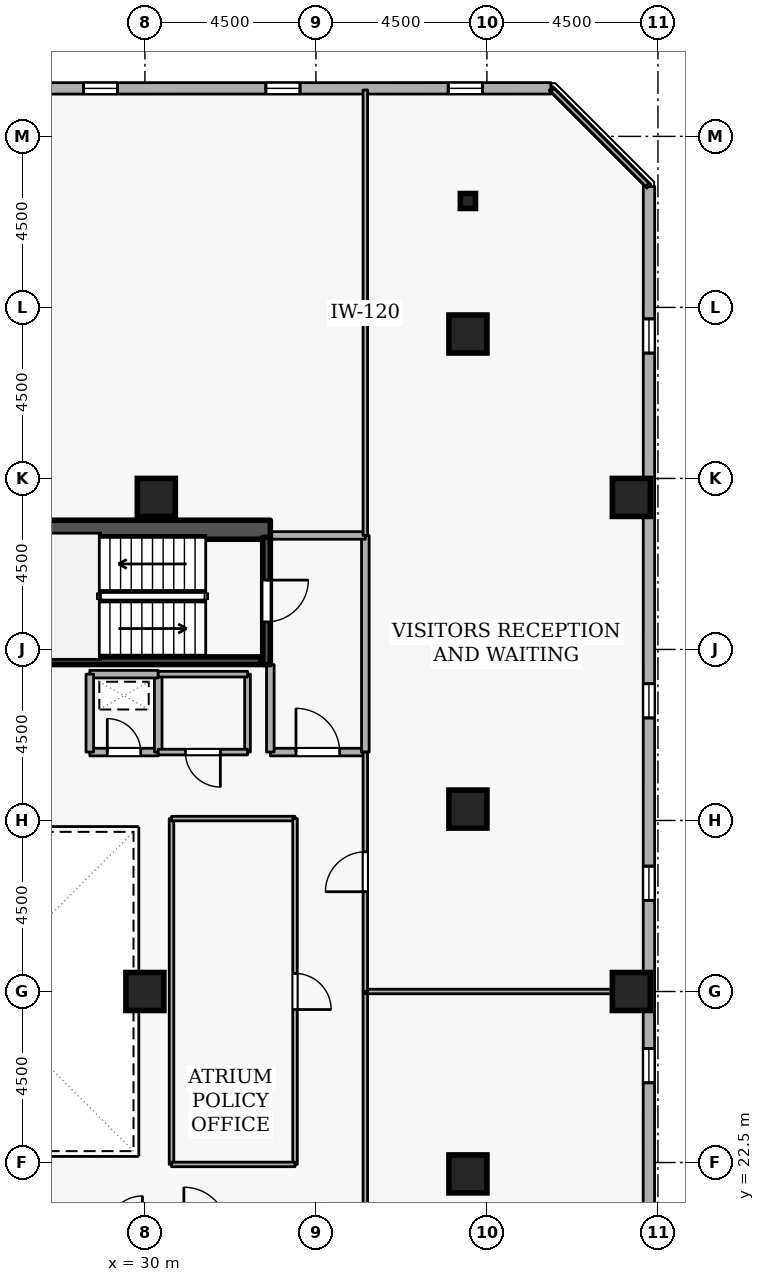
"""IFC4 building model, lengths in metres.
Left out: names, types, materials, properties, quantities, classifications, styles, units other than length and angle.
Written with IfcOpenShell. Run it as: python <this file> out.ifc"""

import sys

from ifc_helpers import new_model, si_unit, direction, frame, frame_2d, origin, origin_2d, place, context, subcontext, project, spatial, rectangle, i_section, extrude, element, fill, save


model = new_model("IFC4")
c1 = context("Model", 3, precision=1e-05, world=origin(), true_north=direction((0.0, 1.0)))
c2 = subcontext(c1, "Body", "Model", "MODEL_VIEW")
j1 = project(units=[si_unit("LENGTHUNIT", "METRE"), si_unit("PLANEANGLEUNIT", "RADIAN")], contexts=[c1])
p1 = place(None, origin())
s1 = spatial("IfcSite", under=j1, at=p1, CompositionType="ELEMENT")
p2 = place(p1, origin())
s2 = spatial("IfcBuilding", under=s1, at=p2, CompositionType="ELEMENT")
p3 = place(p2, frame((0.0, 0.0, 203.7)))
s3 = spatial("IfcBuildingStorey", under=s2, at=p3, CompositionType="ELEMENT", Elevation=203.7)
p4 = place(p3, frame((17.7, 39.15, 0.0), z_axis=(0.0, 0.0, 1.0), x_axis=(1.0, 0.0, 0.0)))
e1 = element("IfcWall", 1, at=p4, inside=s3, PredefinedType="SHEAR", context=c2, shape_type="SweptSolid", body=[
    extrude(rectangle(XDim=15.6, YDim=0.5, at=frame_2d((7.8, 0.0))), origin(), (0.0, 0.0, 1.0), 3.6),
])
for number, where, z_axis, x_axis in (
    (2, (42.8, 27.0, 0.0), (0.0, 0.0, 1.0), (1.0, 0.0, 0.0)),
    (3, (42.8, 40.0, 0.0), (0.0, 0.0, 1.0), (1.0, 0.0, 0.0)),
    (4, (38.5, 44.3, 0.0), (0.0, 0.0, 1.0), (1.0, 0.0, 0.0)),
    (5, (38.5, 22.2, 0.0), (0.0, 0.0, 1.0), (1.0, 0.0, 0.0)),
    (6, (38.5, 31.8, 0.0), (0.0, 0.0, 1.0), (1.0, 0.0, 0.0)),
    (7, (30.3, 40.0, 0.0), (0.0, 0.0, 1.0), (1.0, 0.0, 0.0)),
    (8, (30.0, 27.0, 0.0), (0.0, 0.0, 1.0), (1.0, 0.0, 0.0)),
):
    element("IfcColumn", number, at=place(p3, frame(where, z_axis=z_axis, x_axis=x_axis)), inside=s3, PredefinedType="COLUMN", context=c2, shape_type="SweptSolid", body=[
        extrude(rectangle(XDim=1.0, YDim=1.0, at=origin_2d()), origin(), (0.0, 0.0, 1.0), 3.6),
    ])
p5 = place(p3, frame((38.5, 47.8, 0.0), z_axis=(0.0, 0.0, 1.0), x_axis=(1.0, 0.0, 0.0)))
e9 = element("IfcColumn", 9, at=p5, inside=s3, PredefinedType="COLUMN", context=c2, shape_type="SweptSolid", body=[
    extrude(i_section(OverallWidth=0.399, OverallDepth=0.394, WebThickness=0.023, FlangeThickness=0.037, FilletRadius=0.015, at=origin_2d()), origin(), (0.0, 0.0, 1.0), 3.6),
])
p6 = place(p3, frame((43.26, 13.198, 0.0), z_axis=(0.0, 0.0, 1.0), x_axis=(0.000132597301, 0.999999991209, 0.0)))
e10 = element("IfcWall", 10, at=p6, inside=s3, PredefinedType="STANDARD", context=c2, shape_type="SweptSolid", body=[
    extrude(rectangle(XDim=34.983, YDim=0.3, at=frame_2d((17.492, 0.0))), origin(), (0.0, 0.0, 1.0), 2.7),
])
p7 = place(p6, frame((6.6, 0.0, 0.72)))
e11 = element("IfcOpeningElement", 11, at=p7, cuts=e10, PredefinedType="OPENING", context=c2, shape_type="SweptSolid", body=[
    extrude(rectangle(XDim=0.9, YDim=1.75, at=frame_2d((0.45, 0.875))), frame((0.0, 0.16, 0.0), z_axis=(0.0, -1.0, 0.0), x_axis=(1.0, 0.0, 0.0)), (0.0, 0.0, 1.0), 0.32),
])
p8 = place(p6, frame((11.4, 0.0, 0.72)))
e12 = element("IfcOpeningElement", 12, at=p8, cuts=e10, PredefinedType="OPENING", context=c2, shape_type="SweptSolid", body=[
    extrude(rectangle(XDim=0.9, YDim=1.75, at=frame_2d((0.45, 0.875))), frame((0.0, 0.16, 0.0), z_axis=(0.0, -1.0, 0.0), x_axis=(1.0, 0.0, 0.0)), (0.0, 0.0, 1.0), 0.32),
])
p9 = place(p6, frame((16.2, 0.0, 0.72)))
e13 = element("IfcOpeningElement", 13, at=p9, cuts=e10, PredefinedType="OPENING", context=c2, shape_type="SweptSolid", body=[
    extrude(rectangle(XDim=0.9, YDim=1.75, at=frame_2d((0.45, 0.875))), frame((0.0, 0.16, 0.0), z_axis=(0.0, -1.0, 0.0), x_axis=(1.0, 0.0, 0.0)), (0.0, 0.0, 1.0), 0.32),
])
p10 = place(p6, frame((21.0, 0.0, 0.72)))
e14 = element("IfcOpeningElement", 14, at=p10, cuts=e10, PredefinedType="OPENING", context=c2, shape_type="SweptSolid", body=[
    extrude(rectangle(XDim=0.9, YDim=1.75, at=frame_2d((0.45, 0.875))), frame((0.0, 0.16, 0.0), z_axis=(0.0, -1.0, 0.0), x_axis=(1.0, 0.0, 0.0)), (0.0, 0.0, 1.0), 0.32),
])
p11 = place(p6, frame((30.6, 0.0, 0.72)))
e15 = element("IfcOpeningElement", 15, at=p11, cuts=e10, PredefinedType="OPENING", context=c2, shape_type="SweptSolid", body=[
    extrude(rectangle(XDim=0.9, YDim=1.75, at=frame_2d((0.45, 0.875))), frame((0.0, 0.16, 0.0), z_axis=(0.0, -1.0, 0.0), x_axis=(1.0, 0.0, 0.0)), (0.0, 0.0, 1.0), 0.32),
])
p12 = place(p3, frame((40.681, 50.765, 0.0), z_axis=(0.0, 0.0, 1.0), x_axis=(-0.999999991209, -0.000132597301, 0.0)))
e16 = element("IfcWall", 16, at=p12, inside=s3, PredefinedType="STANDARD", context=c2, shape_type="SweptSolid", body=[
    extrude(rectangle(XDim=34.983, YDim=0.3, at=frame_2d((17.492, 0.0))), origin(), (0.0, 0.0, 1.0), 2.7),
])
p13 = place(p12, frame((1.8, 0.0, 0.72)))
e17 = element("IfcOpeningElement", 17, at=p13, cuts=e16, PredefinedType="OPENING", context=c2, shape_type="SweptSolid", body=[
    extrude(rectangle(XDim=0.9, YDim=1.75, at=frame_2d((0.45, 0.875))), frame((0.0, 0.16, 0.0), z_axis=(0.0, -1.0, 0.0), x_axis=(1.0, 0.0, 0.0)), (0.0, 0.0, 1.0), 0.32),
])
p14 = place(p12, frame((6.6, 0.0, 0.72)))
e18 = element("IfcOpeningElement", 18, at=p14, cuts=e16, PredefinedType="OPENING", context=c2, shape_type="SweptSolid", body=[
    extrude(rectangle(XDim=0.9, YDim=1.75, at=frame_2d((0.45, 0.875))), frame((0.0, 0.16, 0.0), z_axis=(0.0, -1.0, 0.0), x_axis=(1.0, 0.0, 0.0)), (0.0, 0.0, 1.0), 0.32),
])
p15 = place(p12, frame((11.4, 0.0, 0.72)))
e19 = element("IfcOpeningElement", 19, at=p15, cuts=e16, PredefinedType="OPENING", context=c2, shape_type="SweptSolid", body=[
    extrude(rectangle(XDim=0.9, YDim=1.75, at=frame_2d((0.45, 0.875))), frame((0.0, 0.16, 0.0), z_axis=(0.0, -1.0, 0.0), x_axis=(1.0, 0.0, 0.0)), (0.0, 0.0, 1.0), 0.32),
])
p16 = place(p12, frame((16.2, 0.0, 0.72)))
e20 = element("IfcOpeningElement", 20, at=p16, cuts=e16, PredefinedType="OPENING", context=c2, shape_type="SweptSolid", body=[
    extrude(rectangle(XDim=0.9, YDim=1.75, at=frame_2d((0.45, 0.875))), frame((0.0, 0.16, 0.0), z_axis=(0.0, -1.0, 0.0), x_axis=(1.0, 0.0, 0.0)), (0.0, 0.0, 1.0), 0.32),
])
p17 = place(p12, frame((21.0, 0.0, 0.72)))
e21 = element("IfcOpeningElement", 21, at=p17, cuts=e16, PredefinedType="OPENING", context=c2, shape_type="SweptSolid", body=[
    extrude(rectangle(XDim=0.9, YDim=1.75, at=frame_2d((0.45, 0.875))), frame((0.0, 0.16, 0.0), z_axis=(0.0, -1.0, 0.0), x_axis=(1.0, 0.0, 0.0)), (0.0, 0.0, 1.0), 0.32),
])
p18 = place(p12, frame((25.8, 0.0, 0.72)))
e22 = element("IfcOpeningElement", 22, at=p18, cuts=e16, PredefinedType="OPENING", context=c2, shape_type="SweptSolid", body=[
    extrude(rectangle(XDim=0.9, YDim=1.75, at=frame_2d((0.45, 0.875))), frame((0.0, 0.16, 0.0), z_axis=(0.0, -1.0, 0.0), x_axis=(1.0, 0.0, 0.0)), (0.0, 0.0, 1.0), 0.32),
])
p19 = place(p12, frame((30.6, 0.0, 0.72)))
e23 = element("IfcOpeningElement", 23, at=p19, cuts=e16, PredefinedType="OPENING", context=c2, shape_type="SweptSolid", body=[
    extrude(rectangle(XDim=0.9, YDim=1.75, at=frame_2d((0.45, 0.875))), frame((0.0, 0.16, 0.0), z_axis=(0.0, -1.0, 0.0), x_axis=(1.0, 0.0, 0.0)), (0.0, 0.0, 1.0), 0.32),
])
p20 = place(p3, frame((33.2, 38.95, 0.0), z_axis=(0.0, 0.0, 1.0), x_axis=(0.0, -1.0, 0.0)))
e24 = element("IfcWall", 24, at=p20, inside=s3, PredefinedType="SHEAR", context=c2, shape_type="SweptSolid", body=[
    extrude(rectangle(XDim=3.35, YDim=0.2, at=frame_2d((1.675, 0.0))), origin(), (0.0, 0.0, 1.0), 3.6),
])
p21 = place(p20, frame((1.125, 0.0, 0.0)))
e25 = element("IfcOpeningElement", 25, at=p21, cuts=e24, PredefinedType="OPENING", context=c2, shape_type="SweptSolid", body=[
    extrude(rectangle(XDim=1.1, YDim=2.1, at=frame_2d((0.55, 1.05))), frame((0.0, 0.11, 0.0), z_axis=(0.0, -1.0, 0.0), x_axis=(1.0, 0.0, 0.0)), (0.0, 0.0, 1.0), 0.22),
])
p22 = place(p3, frame((25.95, 35.703, 0.0), z_axis=(0.0, 0.0, 1.0), x_axis=(1.0, 0.0, 0.0)))
e26 = element("IfcWall", 26, at=p22, inside=s3, PredefinedType="SHEAR", context=c2, shape_type="SweptSolid", body=[
    extrude(rectangle(XDim=7.1, YDim=0.2, at=frame_2d((3.55, 0.0))), origin(), (0.0, 0.0, 1.0), 3.6),
])
p23 = place(p3, frame((33.3, 33.3, 0.0), z_axis=(0.0, 0.0, 1.0), x_axis=(1.0, 0.0, 0.0)))
e27 = element("IfcWall", 27, at=p23, inside=s3, PredefinedType="STANDARD", context=c2, shape_type="SweptSolid", body=[
    extrude(rectangle(XDim=2.5, YDim=0.2, at=frame_2d((1.25, 0.0))), origin(), (0.0, 0.0, 1.0), 3.34),
])
p24 = place(p23, frame((0.675, 0.0, 0.0)))
e28 = element("IfcOpeningElement", 28, at=p24, cuts=e27, PredefinedType="OPENING", context=c2, shape_type="SweptSolid", body=[
    extrude(rectangle(XDim=1.15, YDim=2.1, at=frame_2d((0.575, 1.05))), frame((0.0, 0.11, 0.0), z_axis=(0.0, -1.0, 0.0), x_axis=(1.0, 0.0, 0.0)), (0.0, 0.0, 1.0), 0.22),
])
p25 = place(p3, frame((35.8, 33.3, 0.0), z_axis=(0.0, 0.0, 1.0), x_axis=(0.0, 1.0, 0.0)))
e29 = element("IfcWall", 29, at=p25, inside=s3, PredefinedType="STANDARD", context=c2, shape_type="SweptSolid", body=[
    extrude(rectangle(XDim=5.7, YDim=0.2, at=frame_2d((2.85, 0.0))), origin(), (0.0, 0.0, 1.0), 3.34),
])
p26 = place(p3, frame((35.8, 39.0, 0.0), z_axis=(0.0, 0.0, 1.0), x_axis=(-1.0, 0.0, 0.0)))
e30 = element("IfcWall", 30, at=p26, inside=s3, PredefinedType="STANDARD", context=c2, shape_type="SweptSolid", body=[
    extrude(rectangle(XDim=2.5, YDim=0.2, at=frame_2d((1.25, 0.0))), origin(), (0.0, 0.0, 1.0), 3.34),
])
p27 = place(p3, frame((33.3, 35.6, 0.0), z_axis=(0.0, 0.0, 1.0), x_axis=(0.0, -1.0, 0.0)))
e31 = element("IfcWall", 31, at=p27, inside=s3, PredefinedType="STANDARD", context=c2, shape_type="SweptSolid", body=[
    extrude(rectangle(XDim=2.3, YDim=0.2, at=frame_2d((1.15, 0.0))), origin(), (0.0, 0.0, 1.0), 2.545),
])
p28 = place(p3, frame((28.55, 33.3, 0.0), z_axis=(0.0, 0.0, 1.0), x_axis=(1.0, 0.0, 0.0)))
e32 = element("IfcWall", 32, at=p28, inside=s3, PredefinedType="STANDARD", context=c2, shape_type="SweptSolid", body=[
    extrude(rectangle(XDim=1.8, YDim=0.2, at=frame_2d((0.9, 0.0))), origin(), (0.0, 0.0, 1.0), 3.34),
])
p29 = place(p28, frame((0.46, 0.0, 0.0)))
e33 = element("IfcOpeningElement", 33, at=p29, cuts=e32, PredefinedType="OPENING", context=c2, shape_type="SweptSolid", body=[
    extrude(rectangle(XDim=0.88, YDim=2.04, at=frame_2d((0.44, 1.02))), frame((0.0, 0.11, 0.0), z_axis=(0.0, -1.0, 0.0), x_axis=(1.0, 0.0, 0.0)), (0.0, 0.0, 1.0), 0.22),
])
p30 = place(p3, frame((30.35, 33.3, 0.0), z_axis=(0.0, 0.0, 1.0), x_axis=(0.0, 1.0, 0.0)))
e34 = element("IfcWall", 34, at=p30, inside=s3, PredefinedType="STANDARD", context=c2, shape_type="SweptSolid", body=[
    extrude(rectangle(XDim=2.05, YDim=0.2, at=frame_2d((1.025, 0.0))), origin(), (0.0, 0.0, 1.0), 3.34),
])
p31 = place(p3, frame((30.35, 35.35, 0.0), z_axis=(0.0, 0.0, 1.0), x_axis=(-1.0, 0.0, 0.0)))
e35 = element("IfcWall", 35, at=p31, inside=s3, PredefinedType="STANDARD", context=c2, shape_type="SweptSolid", body=[
    extrude(rectangle(XDim=1.8, YDim=0.2, at=frame_2d((0.9, 0.0))), origin(), (0.0, 0.0, 1.0), 3.34),
])
p32 = place(p3, frame((28.55, 35.35, 0.0), z_axis=(0.0, 0.0, 1.0), x_axis=(0.0, -1.0, 0.0)))
e36 = element("IfcWall", 36, at=p32, inside=s3, PredefinedType="STANDARD", context=c2, shape_type="SweptSolid", body=[
    extrude(rectangle(XDim=2.05, YDim=0.2, at=frame_2d((1.025, 0.0))), origin(), (0.0, 0.0, 1.0), 3.34),
])
p33 = place(p3, frame((32.7, 35.35, 0.0), z_axis=(0.0, 0.0, 1.0), x_axis=(0.0, -1.0, 0.0)))
e37 = element("IfcWall", 37, at=p33, inside=s3, PredefinedType="PARTITIONING", context=c2, shape_type="SweptSolid", body=[
    extrude(rectangle(XDim=2.05, YDim=0.15, at=frame_2d((1.025, 0.0))), origin(), (0.0, 0.0, 1.0), 2.545),
])
p34 = place(p3, frame((32.7, 33.3, 0.0), z_axis=(0.0, 0.0, 1.0), x_axis=(-1.0, 0.0, 0.0)))
e38 = element("IfcWall", 38, at=p34, inside=s3, PredefinedType="PARTITIONING", context=c2, shape_type="SweptSolid", body=[
    extrude(rectangle(XDim=2.35, YDim=0.15, at=frame_2d((1.175, 0.0))), origin(), (0.0, 0.0, 1.0), 3.34),
])
p35 = place(p34, frame((0.715, 0.0, 0.0)))
e39 = element("IfcOpeningElement", 39, at=p35, cuts=e38, PredefinedType="OPENING", context=c2, shape_type="SweptSolid", body=[
    extrude(rectangle(XDim=0.92, YDim=2.08, at=frame_2d((0.46, 1.04))), frame((0.0, 0.085, 0.0), z_axis=(0.0, -1.0, 0.0), x_axis=(1.0, 0.0, 0.0)), (0.0, 0.0, 1.0), 0.17),
])
p36 = place(p3, frame((30.35, 35.35, 0.0), z_axis=(0.0, 0.0, 1.0), x_axis=(1.0, 0.0, 0.0)))
e40 = element("IfcWall", 40, at=p36, inside=s3, PredefinedType="PARTITIONING", context=c2, shape_type="SweptSolid", body=[
    extrude(rectangle(XDim=2.35, YDim=0.15, at=frame_2d((1.175, 0.0))), origin(), (0.0, 0.0, 1.0), 3.34),
])
p37 = place(p3, frame((35.8, 14.8, 0.0), z_axis=(0.0, 0.0, 1.0), x_axis=(0.0, 1.0, 0.0)))
e41 = element("IfcWall", 41, at=p37, inside=s3, PredefinedType="PARTITIONING", context=c2, shape_type="SweptSolid", body=[
    extrude(rectangle(XDim=12.2, YDim=0.12, at=frame_2d((6.1, 0.0))), origin(), (0.0, 0.0, 1.0), 3.34),
])
p38 = place(p37, frame((5.575, 0.0, 0.0)))
e42 = element("IfcOpeningElement", 42, at=p38, cuts=e41, PredefinedType="OPENING", context=c2, shape_type="SweptSolid", body=[
    extrude(rectangle(XDim=1.05, YDim=2.1, at=frame_2d((0.525, 1.05))), frame((0.0, 0.07, 0.0), z_axis=(0.0, -1.0, 0.0), x_axis=(1.0, 0.0, 0.0)), (0.0, 0.0, 1.0), 0.14),
])
p39 = place(p3, frame((35.8, 27.0, 0.0), z_axis=(0.0, 0.0, 1.0), x_axis=(1.0, 0.0, 0.0)))
e43 = element("IfcWall", 43, at=p39, inside=s3, PredefinedType="PARTITIONING", context=c2, shape_type="SweptSolid", body=[
    extrude(rectangle(XDim=7.42, YDim=0.12, at=frame_2d((3.71, 0.0))), origin(), (0.0, 0.0, 1.0), 2.932),
])
p40 = place(p3, frame((35.8, 39.0, 0.0), z_axis=(0.0, 0.0, 1.0), x_axis=(0.0, 1.0, 0.0)))
e44 = element("IfcWall", 44, at=p40, inside=s3, PredefinedType="PARTITIONING", context=c2, shape_type="SweptSolid", body=[
    extrude(rectangle(XDim=11.72, YDim=0.12, at=frame_2d((5.86, 0.0))), origin(), (0.0, 0.0, 1.0), 3.34),
])
p41 = place(p3, frame((40.725, 50.72, 0.0), z_axis=(0.0, 0.0, 1.0), x_axis=(0.707106781187, -0.707106781187, 0.0)))
e45 = element("IfcWall", 45, at=p41, inside=s3, PredefinedType="PARTITIONING", context=c2, shape_type="SweptSolid", body=[
    extrude(rectangle(XDim=3.528, YDim=0.12, at=frame_2d((1.764, 0.0))), origin(), (0.0, 0.0, 1.0), 3.34),
])
p42 = place(p3, frame((35.8, 27.0, 0.0), z_axis=(0.0, 0.0, 1.0), x_axis=(0.0, 1.0, 0.0)))
e46 = element("IfcWall", 46, at=p42, inside=s3, PredefinedType="PARTITIONING", context=c2, shape_type="SweptSolid", body=[
    extrude(rectangle(XDim=6.3, YDim=0.12, at=frame_2d((3.15, 0.0))), origin(), (0.0, 0.0, 1.0), 3.34),
])
p43 = place(p42, frame((2.625, 0.0, 0.0)))
e47 = element("IfcOpeningElement", 47, at=p43, cuts=e46, PredefinedType="OPENING", context=c2, shape_type="SweptSolid", body=[
    extrude(rectangle(XDim=1.05, YDim=2.1, at=frame_2d((0.525, 1.05))), frame((0.0, 0.07, 0.0), z_axis=(0.0, -1.0, 0.0), x_axis=(1.0, 0.0, 0.0)), (0.0, 0.0, 1.0), 0.14),
])
p44 = place(p3, frame((30.7, 22.45, 0.0), z_axis=(0.0, 0.0, 1.0), x_axis=(0.0, 1.0, 0.0)))
e48 = element("IfcWall", 48, at=p44, inside=s3, PredefinedType="PARTITIONING", context=c2, shape_type="SweptSolid", body=[
    extrude(rectangle(XDim=9.1, YDim=0.12, at=frame_2d((4.55, 0.0))), origin(), (0.0, 0.0, 1.0), 3.34),
])
p45 = place(p3, frame((30.7, 31.55, 0.0), z_axis=(0.0, 0.0, 1.0), x_axis=(1.0, 0.0, 0.0)))
e49 = element("IfcWall", 49, at=p45, inside=s3, PredefinedType="PARTITIONING", context=c2, shape_type="SweptSolid", body=[
    extrude(rectangle(XDim=3.25, YDim=0.12, at=frame_2d((1.625, 0.0))), origin(), (0.0, 0.0, 1.0), 3.34),
])
p46 = place(p3, frame((33.95, 31.55, 0.0), z_axis=(0.0, 0.0, 1.0), x_axis=(0.0, -1.0, 0.0)))
e50 = element("IfcWall", 50, at=p46, inside=s3, PredefinedType="PARTITIONING", context=c2, shape_type="SweptSolid", body=[
    extrude(rectangle(XDim=9.1, YDim=0.12, at=frame_2d((4.55, 0.0))), origin(), (0.0, 0.0, 1.0), 3.34),
])
p47 = place(p46, frame((4.075, 0.0, 0.0)))
e51 = element("IfcOpeningElement", 51, at=p47, cuts=e50, PredefinedType="OPENING", context=c2, shape_type="SweptSolid", body=[
    extrude(rectangle(XDim=0.95, YDim=2.1, at=frame_2d((0.475, 1.05))), frame((0.0, 0.07, 0.0), z_axis=(0.0, -1.0, 0.0), x_axis=(1.0, 0.0, 0.0)), (0.0, 0.0, 1.0), 0.14),
])
p48 = place(p3, frame((33.95, 22.45, 0.0), z_axis=(0.0, 0.0, 1.0), x_axis=(-1.0, 0.0, 0.0)))
e52 = element("IfcWall", 52, at=p48, inside=s3, PredefinedType="PARTITIONING", context=c2, shape_type="SweptSolid", body=[
    extrude(rectangle(XDim=3.25, YDim=0.12, at=frame_2d((1.625, 0.0))), origin(), (0.0, 0.0, 1.0), 3.34),
])
p49 = place(p8, origin())
e53 = element("IfcWindow", 53, at=p49, inside=s3, PartitioningType="SINGLE_PANEL", PredefinedType="WINDOW", context=c2, shape_type="SweptSolid", body=[
    extrude(rectangle(XDim=0.9, YDim=1.75, at=frame_2d((0.45, 0.875))), frame((0.0, 0.03, 0.0), z_axis=(0.0, -1.0, 0.0), x_axis=(1.0, 0.0, 0.0)), (0.0, 0.0, 1.0), 0.06),
])
fill(e12, e53)
p50 = place(p9, origin())
e54 = element("IfcWindow", 54, at=p50, inside=s3, PartitioningType="SINGLE_PANEL", PredefinedType="WINDOW", context=c2, shape_type="SweptSolid", body=[
    extrude(rectangle(XDim=0.9, YDim=1.75, at=frame_2d((0.45, 0.875))), frame((0.0, 0.03, 0.0), z_axis=(0.0, -1.0, 0.0), x_axis=(1.0, 0.0, 0.0)), (0.0, 0.0, 1.0), 0.06),
])
fill(e13, e54)
p51 = place(p10, origin())
e55 = element("IfcWindow", 55, at=p51, inside=s3, PartitioningType="SINGLE_PANEL", PredefinedType="WINDOW", context=c2, shape_type="SweptSolid", body=[
    extrude(rectangle(XDim=0.9, YDim=1.75, at=frame_2d((0.45, 0.875))), frame((0.0, 0.03, 0.0), z_axis=(0.0, -1.0, 0.0), x_axis=(1.0, 0.0, 0.0)), (0.0, 0.0, 1.0), 0.06),
])
fill(e14, e55)
p52 = place(p11, origin())
e56 = element("IfcWindow", 56, at=p52, inside=s3, PartitioningType="SINGLE_PANEL", PredefinedType="WINDOW", context=c2, shape_type="SweptSolid", body=[
    extrude(rectangle(XDim=0.9, YDim=1.75, at=frame_2d((0.45, 0.875))), frame((0.0, 0.03, 0.0), z_axis=(0.0, -1.0, 0.0), x_axis=(1.0, 0.0, 0.0)), (0.0, 0.0, 1.0), 0.06),
])
fill(e15, e56)
p53 = place(p13, origin())
e57 = element("IfcWindow", 57, at=p53, inside=s3, PartitioningType="SINGLE_PANEL", PredefinedType="WINDOW", context=c2, shape_type="SweptSolid", body=[
    extrude(rectangle(XDim=0.9, YDim=1.75, at=frame_2d((0.45, 0.875))), frame((0.0, 0.03, 0.0), z_axis=(0.0, -1.0, 0.0), x_axis=(1.0, 0.0, 0.0)), (0.0, 0.0, 1.0), 0.06),
])
fill(e17, e57)
p54 = place(p14, origin())
e58 = element("IfcWindow", 58, at=p54, inside=s3, PartitioningType="SINGLE_PANEL", PredefinedType="WINDOW", context=c2, shape_type="SweptSolid", body=[
    extrude(rectangle(XDim=0.9, YDim=1.75, at=frame_2d((0.45, 0.875))), frame((0.0, 0.03, 0.0), z_axis=(0.0, -1.0, 0.0), x_axis=(1.0, 0.0, 0.0)), (0.0, 0.0, 1.0), 0.06),
])
fill(e18, e58)
p55 = place(p15, origin())
e59 = element("IfcWindow", 59, at=p55, inside=s3, PartitioningType="SINGLE_PANEL", PredefinedType="WINDOW", context=c2, shape_type="SweptSolid", body=[
    extrude(rectangle(XDim=0.9, YDim=1.75, at=frame_2d((0.45, 0.875))), frame((0.0, 0.03, 0.0), z_axis=(0.0, -1.0, 0.0), x_axis=(1.0, 0.0, 0.0)), (0.0, 0.0, 1.0), 0.06),
])
fill(e19, e59)
p56 = place(p21, origin())
e60 = element("IfcDoor", 60, at=p56, inside=s3, OperationType="SINGLE_SWING_LEFT", PredefinedType="DOOR", context=c2, shape_type="SweptSolid", body=[
    extrude(rectangle(XDim=1.1, YDim=2.1, at=frame_2d((0.55, 1.05))), frame((0.0, 0.025, 0.0), z_axis=(0.0, -1.0, 0.0), x_axis=(1.0, 0.0, 0.0)), (0.0, 0.0, 1.0), 0.05),
])
fill(e25, e60)
p57 = place(p24, origin())
e61 = element("IfcDoor", 61, at=p57, inside=s3, OperationType="SINGLE_SWING_LEFT", PredefinedType="DOOR", context=c2, shape_type="SweptSolid", body=[
    extrude(rectangle(XDim=1.15, YDim=2.1, at=frame_2d((0.575, 1.05))), frame((0.0, 0.025, 0.0), z_axis=(0.0, -1.0, 0.0), x_axis=(1.0, 0.0, 0.0)), (0.0, 0.0, 1.0), 0.05),
])
fill(e28, e61)
p58 = place(p29, origin())
e62 = element("IfcDoor", 62, at=p58, inside=s3, OperationType="SINGLE_SWING_LEFT", PredefinedType="DOOR", context=c2, shape_type="SweptSolid", body=[
    extrude(rectangle(XDim=0.88, YDim=2.04, at=frame_2d((0.44, 1.02))), frame((0.0, 0.025, 0.0), z_axis=(0.0, -1.0, 0.0), x_axis=(1.0, 0.0, 0.0)), (0.0, 0.0, 1.0), 0.05),
])
fill(e33, e62)
p59 = place(p35, origin())
e63 = element("IfcDoor", 63, at=p59, inside=s3, OperationType="SINGLE_SWING_LEFT", PredefinedType="DOOR", context=c2, shape_type="SweptSolid", body=[
    extrude(rectangle(XDim=0.92, YDim=2.08, at=frame_2d((0.46, 1.04))), frame((0.0, 0.025, 0.0), z_axis=(0.0, -1.0, 0.0), x_axis=(1.0, 0.0, 0.0)), (0.0, 0.0, 1.0), 0.05),
])
fill(e39, e63)
p60 = place(p43, origin())
e64 = element("IfcDoor", 64, at=p60, inside=s3, OperationType="SINGLE_SWING_LEFT", PredefinedType="DOOR", context=c2, shape_type="SweptSolid", body=[
    extrude(rectangle(XDim=1.05, YDim=2.1, at=frame_2d((0.525, 1.05))), frame((0.0, 0.025, 0.0), z_axis=(0.0, -1.0, 0.0), x_axis=(1.0, 0.0, 0.0)), (0.0, 0.0, 1.0), 0.05),
])
fill(e47, e64)
p61 = place(p47, origin())
e65 = element("IfcDoor", 65, at=p61, inside=s3, OperationType="SINGLE_SWING_RIGHT", PredefinedType="DOOR", context=c2, shape_type="SweptSolid", body=[
    extrude(rectangle(XDim=0.95, YDim=2.1, at=frame_2d((0.475, 1.05))), frame((0.0, 0.025, 0.0), z_axis=(0.0, -1.0, 0.0), x_axis=(1.0, 0.0, 0.0)), (0.0, 0.0, 1.0), 0.05),
])
fill(e51, e65)
save(model, sys.argv[1])
